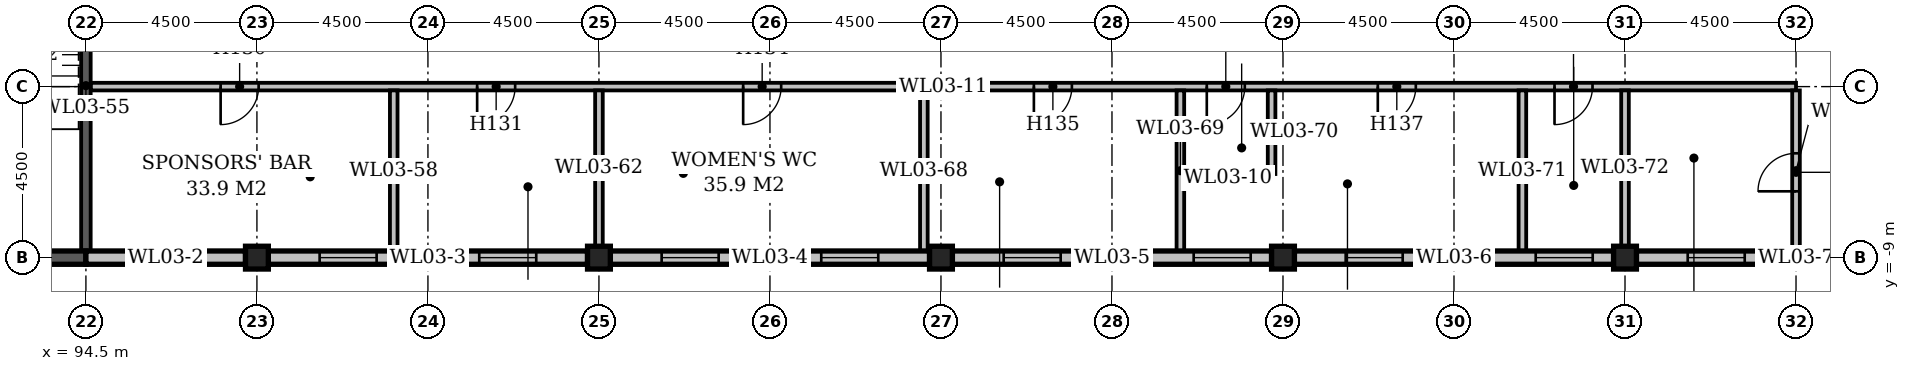
"""IFC4 building model, lengths in metres.
Left out: names, types, materials, properties, quantities, classifications, styles, units other than length and angle.
Written with IfcOpenShell. Run it as: python <this file> out.ifc"""

import sys

from ifc_helpers import new_model, si_unit, direction, frame, frame_2d, origin, origin_2d, place, context, subcontext, project, spatial, rectangle, extrude, element, fill, save


model = new_model("IFC4")
c1 = context("Model", 3, precision=1e-05, world=origin(), true_north=direction((0.0, 1.0)))
c2 = subcontext(c1, "Body", "Model", "MODEL_VIEW")
j1 = project(units=[si_unit("LENGTHUNIT", "METRE"), si_unit("PLANEANGLEUNIT", "RADIAN")], contexts=[c1])
p1 = place(None, origin())
s1 = spatial("IfcSite", under=j1, at=p1, CompositionType="ELEMENT")
p2 = place(p1, origin())
s2 = spatial("IfcBuilding", under=s1, at=p2, CompositionType="ELEMENT")
p3 = place(p2, frame((0.0, 0.0, 19.0)))
s3 = spatial("IfcBuildingStorey", under=s2, at=p3, CompositionType="ELEMENT", Elevation=19.0)
for number, where, z_axis, x_axis in (
    (1, (99.0, -9.0, 0.0), (0.0, 0.0, 1.0), (1.0, 0.0, 0.0)),
    (2, (108.0, -9.0, 0.0), (0.0, 0.0, 1.0), (1.0, 0.0, 0.0)),
    (3, (117.0, -9.0, 0.0), (0.0, 0.0, 1.0), (1.0, 0.0, 0.0)),
    (4, (126.0, -9.0, 0.0), (0.0, 0.0, 1.0), (1.0, 0.0, 0.0)),
    (5, (135.0, -9.0, 0.0), (0.0, 0.0, 1.0), (1.0, 0.0, 0.0)),
):
    element("IfcColumn", number, at=place(p3, frame(where, z_axis=z_axis, x_axis=x_axis)), inside=s3, PredefinedType="COLUMN", context=c2, shape_type="SweptSolid", body=[
        extrude(rectangle(XDim=0.6, YDim=0.6, at=origin_2d()), origin(), (0.0, 0.0, 1.0), 4.7),
    ])
p4 = place(p3, frame((90.35, -9.0, 0.0), z_axis=(0.0, 0.0, 1.0), x_axis=(1.0, 0.0, 0.0)))
e6 = element("IfcWall", 6, at=p4, inside=s3, PredefinedType="STANDARD", context=c2, shape_type="SweptSolid", body=[
    extrude(rectangle(XDim=4.15, YDim=0.35, at=frame_2d((2.075, 0.0))), origin(), (0.0, 0.0, 1.0), 5.0),
])
p5 = place(p3, frame((94.5, -9.0, 0.0), z_axis=(0.0, 0.0, 1.0), x_axis=(1.0, 0.0, 0.0)))
e7 = element("IfcWall", 7, at=p5, inside=s3, PredefinedType="STANDARD", context=c2, shape_type="SweptSolid", body=[
    extrude(rectangle(XDim=4.2, YDim=0.35, at=frame_2d((2.1, 0.0))), origin(), (0.0, 0.0, 1.0), 4.1),
])
p6 = place(p5, frame((1.35, 0.0, 1.0)))
e8 = element("IfcOpeningElement", 8, at=p6, cuts=e7, PredefinedType="OPENING", context=c2, shape_type="SweptSolid", body=[
    extrude(rectangle(XDim=1.5, YDim=2.4, at=frame_2d((0.75, 1.2))), frame((0.0, 0.187, 0.0), z_axis=(0.0, -1.0, 0.0), x_axis=(1.0, 0.0, 0.0)), (0.0, 0.0, 1.0), 0.374),
])
p7 = place(p3, frame((99.3, -9.0, 0.0), z_axis=(0.0, 0.0, 1.0), x_axis=(1.0, 0.0, 0.0)))
e9 = element("IfcWall", 9, at=p7, inside=s3, PredefinedType="STANDARD", context=c2, shape_type="SweptSolid", body=[
    extrude(rectangle(XDim=8.4, YDim=0.35, at=frame_2d((4.2, 0.0))), origin(), (0.0, 0.0, 1.0), 4.1),
])
p8 = place(p7, frame((1.35, 0.0, 1.0)))
e10 = element("IfcOpeningElement", 10, at=p8, cuts=e9, PredefinedType="OPENING", context=c2, shape_type="SweptSolid", body=[
    extrude(rectangle(XDim=1.5, YDim=2.4, at=frame_2d((0.75, 1.2))), frame((0.0, 0.187, 0.0), z_axis=(0.0, -1.0, 0.0), x_axis=(1.0, 0.0, 0.0)), (0.0, 0.0, 1.0), 0.374),
])
p9 = place(p7, frame((5.55, 0.0, 1.0)))
e11 = element("IfcOpeningElement", 11, at=p9, cuts=e9, PredefinedType="OPENING", context=c2, shape_type="SweptSolid", body=[
    extrude(rectangle(XDim=1.5, YDim=2.4, at=frame_2d((0.75, 1.2))), frame((0.0, 0.187, 0.0), z_axis=(0.0, -1.0, 0.0), x_axis=(1.0, 0.0, 0.0)), (0.0, 0.0, 1.0), 0.374),
])
p10 = place(p3, frame((108.3, -9.0, 0.0), z_axis=(0.0, 0.0, 1.0), x_axis=(1.0, 0.0, 0.0)))
e12 = element("IfcWall", 12, at=p10, inside=s3, PredefinedType="STANDARD", context=c2, shape_type="SweptSolid", body=[
    extrude(rectangle(XDim=8.4, YDim=0.35, at=frame_2d((4.2, 0.0))), origin(), (0.0, 0.0, 1.0), 4.1),
])
p11 = place(p10, frame((1.35, 0.0, 1.0)))
e13 = element("IfcOpeningElement", 13, at=p11, cuts=e12, PredefinedType="OPENING", context=c2, shape_type="SweptSolid", body=[
    extrude(rectangle(XDim=1.5, YDim=2.4, at=frame_2d((0.75, 1.2))), frame((0.0, 0.187, 0.0), z_axis=(0.0, -1.0, 0.0), x_axis=(1.0, 0.0, 0.0)), (0.0, 0.0, 1.0), 0.374),
])
p12 = place(p10, frame((5.55, 0.0, 1.0)))
e14 = element("IfcOpeningElement", 14, at=p12, cuts=e12, PredefinedType="OPENING", context=c2, shape_type="SweptSolid", body=[
    extrude(rectangle(XDim=1.5, YDim=2.4, at=frame_2d((0.75, 1.2))), frame((0.0, 0.187, 0.0), z_axis=(0.0, -1.0, 0.0), x_axis=(1.0, 0.0, 0.0)), (0.0, 0.0, 1.0), 0.374),
])
p13 = place(p3, frame((117.3, -9.0, 0.0), z_axis=(0.0, 0.0, 1.0), x_axis=(1.0, 0.0, 0.0)))
e15 = element("IfcWall", 15, at=p13, inside=s3, PredefinedType="STANDARD", context=c2, shape_type="SweptSolid", body=[
    extrude(rectangle(XDim=8.4, YDim=0.35, at=frame_2d((4.2, 0.0))), origin(), (0.0, 0.0, 1.0), 4.1),
])
p14 = place(p13, frame((1.35, 0.0, 1.0)))
e16 = element("IfcOpeningElement", 16, at=p14, cuts=e15, PredefinedType="OPENING", context=c2, shape_type="SweptSolid", body=[
    extrude(rectangle(XDim=1.5, YDim=2.4, at=frame_2d((0.75, 1.2))), frame((0.0, 0.187, 0.0), z_axis=(0.0, -1.0, 0.0), x_axis=(1.0, 0.0, 0.0)), (0.0, 0.0, 1.0), 0.374),
])
p15 = place(p13, frame((6.35, 0.0, 1.0)))
e17 = element("IfcOpeningElement", 17, at=p15, cuts=e15, PredefinedType="OPENING", context=c2, shape_type="SweptSolid", body=[
    extrude(rectangle(XDim=1.5, YDim=2.4, at=frame_2d((0.75, 1.2))), frame((0.0, 0.187, 0.0), z_axis=(0.0, -1.0, 0.0), x_axis=(1.0, 0.0, 0.0)), (0.0, 0.0, 1.0), 0.374),
])
p16 = place(p3, frame((126.3, -9.0, 0.0), z_axis=(0.0, 0.0, 1.0), x_axis=(1.0, 0.0, 0.0)))
e18 = element("IfcWall", 18, at=p16, inside=s3, PredefinedType="STANDARD", context=c2, shape_type="SweptSolid", body=[
    extrude(rectangle(XDim=8.4, YDim=0.35, at=frame_2d((4.2, 0.0))), origin(), (0.0, 0.0, 1.0), 4.1),
])
p17 = place(p16, frame((1.35, 0.0, 1.0)))
e19 = element("IfcOpeningElement", 19, at=p17, cuts=e18, PredefinedType="OPENING", context=c2, shape_type="SweptSolid", body=[
    extrude(rectangle(XDim=1.5, YDim=2.4, at=frame_2d((0.75, 1.2))), frame((0.0, 0.187, 0.0), z_axis=(0.0, -1.0, 0.0), x_axis=(1.0, 0.0, 0.0)), (0.0, 0.0, 1.0), 0.374),
])
p18 = place(p16, frame((6.35, 0.0, 1.0)))
e20 = element("IfcOpeningElement", 20, at=p18, cuts=e18, PredefinedType="OPENING", context=c2, shape_type="SweptSolid", body=[
    extrude(rectangle(XDim=1.5, YDim=2.4, at=frame_2d((0.75, 1.2))), frame((0.0, 0.187, 0.0), z_axis=(0.0, -1.0, 0.0), x_axis=(1.0, 0.0, 0.0)), (0.0, 0.0, 1.0), 0.374),
])
p19 = place(p3, frame((135.3, -9.0, 0.0), z_axis=(0.0, 0.0, 1.0), x_axis=(1.0, 0.0, 0.0)))
e21 = element("IfcWall", 21, at=p19, inside=s3, PredefinedType="STANDARD", context=c2, shape_type="SweptSolid", body=[
    extrude(rectangle(XDim=8.4, YDim=0.35, at=frame_2d((4.2, 0.0))), origin(), (0.0, 0.0, 1.0), 4.1),
])
p20 = place(p19, frame((1.35, 0.0, 1.0)))
e22 = element("IfcOpeningElement", 22, at=p20, cuts=e21, PredefinedType="OPENING", context=c2, shape_type="SweptSolid", body=[
    extrude(rectangle(XDim=1.5, YDim=2.4, at=frame_2d((0.75, 1.2))), frame((0.0, 0.187, 0.0), z_axis=(0.0, -1.0, 0.0), x_axis=(1.0, 0.0, 0.0)), (0.0, 0.0, 1.0), 0.374),
])
p21 = place(p3, frame((123.4, -6.9, 0.0), z_axis=(0.0, 0.0, 1.0), x_axis=(1.0, 0.0, 0.0)))
e23 = element("IfcWall", 23, at=p21, inside=s3, PredefinedType="STANDARD", context=c2, shape_type="SweptSolid", body=[
    extrude(rectangle(XDim=2.3, YDim=0.2, at=frame_2d((1.15, 0.0))), origin(), (0.0, 0.0, 1.0), 4.7),
])
p22 = place(p3, frame((94.625, -4.5, 0.0), z_axis=(0.0, 0.0, 1.0), x_axis=(1.0, 0.0, 0.0)))
e24 = element("IfcWall", 24, at=p22, inside=s3, PredefinedType="STANDARD", context=c2, shape_type="SweptSolid", body=[
    extrude(rectangle(XDim=44.875, YDim=0.2, at=frame_2d((22.438, 0.0))), origin(), (0.0, 0.0, 1.0), 4.7),
])
p23 = place(p22, frame((3.42, 0.0, 0.0)))
e25 = element("IfcOpeningElement", 25, at=p23, cuts=e24, PredefinedType="OPENING", context=c2, shape_type="SweptSolid", body=[
    extrude(rectangle(XDim=1.0, YDim=2.1, at=frame_2d((0.5, 1.05))), frame((0.0, 0.112, 0.0), z_axis=(0.0, -1.0, 0.0), x_axis=(1.0, 0.0, 0.0)), (0.0, 0.0, 1.0), 0.224),
])
p24 = place(p22, frame((10.17, 0.0, 0.0)))
e26 = element("IfcOpeningElement", 26, at=p24, cuts=e24, PredefinedType="OPENING", context=c2, shape_type="SweptSolid", body=[
    extrude(rectangle(XDim=1.0, YDim=2.1, at=frame_2d((0.5, 1.05))), frame((0.0, 0.112, 0.0), z_axis=(0.0, -1.0, 0.0), x_axis=(1.0, 0.0, 0.0)), (0.0, 0.0, 1.0), 0.224),
])
p25 = place(p22, frame((17.17, 0.0, 0.0)))
e27 = element("IfcOpeningElement", 27, at=p25, cuts=e24, PredefinedType="OPENING", context=c2, shape_type="SweptSolid", body=[
    extrude(rectangle(XDim=1.0, YDim=2.1, at=frame_2d((0.5, 1.05))), frame((0.0, 0.112, 0.0), z_axis=(0.0, -1.0, 0.0), x_axis=(1.0, 0.0, 0.0)), (0.0, 0.0, 1.0), 0.224),
])
p26 = place(p22, frame((24.82, 0.0, 0.0)))
e28 = element("IfcOpeningElement", 28, at=p26, cuts=e24, PredefinedType="OPENING", context=c2, shape_type="SweptSolid", body=[
    extrude(rectangle(XDim=1.0, YDim=2.1, at=frame_2d((0.5, 1.05))), frame((0.0, 0.112, 0.0), z_axis=(0.0, -1.0, 0.0), x_axis=(1.0, 0.0, 0.0)), (0.0, 0.0, 1.0), 0.224),
])
p27 = place(p22, frame((29.37, 0.0, 0.0)))
e29 = element("IfcOpeningElement", 29, at=p27, cuts=e24, PredefinedType="OPENING", context=c2, shape_type="SweptSolid", body=[
    extrude(rectangle(XDim=1.0, YDim=2.1, at=frame_2d((0.5, 1.05))), frame((0.0, 0.112, 0.0), z_axis=(0.0, -1.0, 0.0), x_axis=(1.0, 0.0, 0.0)), (0.0, 0.0, 1.0), 0.224),
])
p28 = place(p22, frame((33.87, 0.0, 0.0)))
e30 = element("IfcOpeningElement", 30, at=p28, cuts=e24, PredefinedType="OPENING", context=c2, shape_type="SweptSolid", body=[
    extrude(rectangle(XDim=1.0, YDim=2.1, at=frame_2d((0.5, 1.05))), frame((0.0, 0.112, 0.0), z_axis=(0.0, -1.0, 0.0), x_axis=(1.0, 0.0, 0.0)), (0.0, 0.0, 1.0), 0.224),
])
p29 = place(p22, frame((38.52, 0.0, 0.0)))
e31 = element("IfcOpeningElement", 31, at=p29, cuts=e24, PredefinedType="OPENING", context=c2, shape_type="SweptSolid", body=[
    extrude(rectangle(XDim=1.0, YDim=2.1, at=frame_2d((0.5, 1.05))), frame((0.0, 0.112, 0.0), z_axis=(0.0, -1.0, 0.0), x_axis=(1.0, 0.0, 0.0)), (0.0, 0.0, 1.0), 0.224),
])
p30 = place(p3, frame((94.5, -8.825, 0.0), z_axis=(0.0, 0.0, 1.0), x_axis=(0.0, 1.0, 0.0)))
e32 = element("IfcWall", 32, at=p30, inside=s3, PredefinedType="STANDARD", context=c2, shape_type="SweptSolid", body=[
    extrude(rectangle(XDim=8.7, YDim=0.25, at=frame_2d((4.35, 0.0))), origin(), (0.0, 0.0, 1.0), 5.0),
])
p31 = place(p30, frame((7.22, 0.0, 0.0)))
e33 = element("IfcOpeningElement", 33, at=p31, cuts=e32, PredefinedType="OPENING", context=c2, shape_type="SweptSolid", body=[
    extrude(rectangle(XDim=1.2, YDim=2.1, at=frame_2d((0.6, 1.05))), frame((0.0, 0.137, 0.0), z_axis=(0.0, -1.0, 0.0), x_axis=(1.0, 0.0, 0.0)), (0.0, 0.0, 1.0), 0.274),
])
p32 = place(p3, frame((102.6, -8.825, 0.0), z_axis=(0.0, 0.0, 1.0), x_axis=(0.0, 1.0, 0.0)))
e34 = element("IfcWall", 34, at=p32, inside=s3, PredefinedType="STANDARD", context=c2, shape_type="SweptSolid", body=[
    extrude(rectangle(XDim=4.225, YDim=0.2, at=frame_2d((2.112, 0.0))), origin(), (0.0, 0.0, 1.0), 4.7),
])
p33 = place(p3, frame((108.0, -8.7, 0.0), z_axis=(0.0, 0.0, 1.0), x_axis=(0.0, 1.0, 0.0)))
e35 = element("IfcWall", 35, at=p33, inside=s3, PredefinedType="STANDARD", context=c2, shape_type="SweptSolid", body=[
    extrude(rectangle(XDim=4.1, YDim=0.2, at=frame_2d((2.05, 0.0))), origin(), (0.0, 0.0, 1.0), 4.7),
])
for number, where, z_axis, x_axis in (
    (36, (116.55, -8.825, 0.0), (0.0, 0.0, 1.0), (0.0, 1.0, 0.0)),
    (37, (123.3, -8.825, 0.0), (0.0, 0.0, 1.0), (0.0, 1.0, 0.0)),
):
    element("IfcWall", number, at=place(p3, frame(where, z_axis=z_axis, x_axis=x_axis)), inside=s3, PredefinedType="STANDARD", context=c2, shape_type="SweptSolid", body=[
        extrude(rectangle(XDim=4.225, YDim=0.2, at=frame_2d((2.112, 0.0))), origin(), (0.0, 0.0, 1.0), 4.7),
    ])
p34 = place(p3, frame((125.7, -6.8, 0.0), z_axis=(0.0, 0.0, 1.0), x_axis=(0.0, 1.0, 0.0)))
e38 = element("IfcWall", 38, at=p34, inside=s3, PredefinedType="STANDARD", context=c2, shape_type="SweptSolid", body=[
    extrude(rectangle(XDim=2.2, YDim=0.2, at=frame_2d((1.1, 0.0))), origin(), (0.0, 0.0, 1.0), 4.7),
])
p35 = place(p3, frame((132.3, -8.825, 0.0), z_axis=(0.0, 0.0, 1.0), x_axis=(0.0, 1.0, 0.0)))
e39 = element("IfcWall", 39, at=p35, inside=s3, PredefinedType="STANDARD", context=c2, shape_type="SweptSolid", body=[
    extrude(rectangle(XDim=4.225, YDim=0.2, at=frame_2d((2.112, 0.0))), origin(), (0.0, 0.0, 1.0), 4.7),
])
p36 = place(p3, frame((135.0, -8.7, 0.0), z_axis=(0.0, 0.0, 1.0), x_axis=(0.0, 1.0, 0.0)))
e40 = element("IfcWall", 40, at=p36, inside=s3, PredefinedType="STANDARD", context=c2, shape_type="SweptSolid", body=[
    extrude(rectangle(XDim=4.1, YDim=0.2, at=frame_2d((2.05, 0.0))), origin(), (0.0, 0.0, 1.0), 4.7),
])
p37 = place(p3, frame((139.5, -8.825, 0.0), z_axis=(0.0, 0.0, 1.0), x_axis=(0.0, 1.0, 0.0)))
e41 = element("IfcWall", 41, at=p37, inside=s3, PredefinedType="STANDARD", context=c2, shape_type="SweptSolid", body=[
    extrude(rectangle(XDim=4.225, YDim=0.2, at=frame_2d((2.112, 0.0))), origin(), (0.0, 0.0, 1.0), 4.7),
])
p38 = place(p37, frame((1.57, 0.0, 0.0)))
e42 = element("IfcOpeningElement", 42, at=p38, cuts=e41, PredefinedType="OPENING", context=c2, shape_type="SweptSolid", body=[
    extrude(rectangle(XDim=1.0, YDim=2.1, at=frame_2d((0.5, 1.05))), frame((0.0, 0.112, 0.0), z_axis=(0.0, -1.0, 0.0), x_axis=(1.0, 0.0, 0.0)), (0.0, 0.0, 1.0), 0.224),
])
p39 = place(p23, frame((1.0, 0.0, 0.0), z_axis=(0.0, 0.0, 1.0), x_axis=(-1.0, 0.0, 0.0)))
e43 = element("IfcDoor", 43, at=p39, inside=s3, OperationType="SINGLE_SWING_RIGHT", PredefinedType="DOOR", context=c2, shape_type="SweptSolid", body=[
    extrude(rectangle(XDim=1.0, YDim=2.1, at=frame_2d((0.5, 1.05))), frame((0.0, 0.025, 0.0), z_axis=(0.0, -1.0, 0.0), x_axis=(1.0, 0.0, 0.0)), (0.0, 0.0, 1.0), 0.05),
])
fill(e25, e43)
p40 = place(p24, frame((1.0, 0.0, 0.0), z_axis=(0.0, 0.0, 1.0), x_axis=(-1.0, 0.0, 0.0)))
e44 = element("IfcDoor", 44, at=p40, inside=s3, OperationType="SINGLE_SWING_RIGHT", PredefinedType="DOOR", context=c2, shape_type="SweptSolid", body=[
    extrude(rectangle(XDim=1.0, YDim=2.1, at=frame_2d((0.5, 1.05))), frame((0.0, 0.025, 0.0), z_axis=(0.0, -1.0, 0.0), x_axis=(1.0, 0.0, 0.0)), (0.0, 0.0, 1.0), 0.05),
])
fill(e26, e44)
p41 = place(p38, origin())
e45 = element("IfcDoor", 45, at=p41, inside=s3, OperationType="SINGLE_SWING_LEFT", PredefinedType="DOOR", context=c2, shape_type="SweptSolid", body=[
    extrude(rectangle(XDim=1.0, YDim=2.1, at=frame_2d((0.5, 1.05))), frame((0.0, 0.025, 0.0), z_axis=(0.0, -1.0, 0.0), x_axis=(1.0, 0.0, 0.0)), (0.0, 0.0, 1.0), 0.05),
])
fill(e42, e45)
p42 = place(p25, frame((1.0, 0.0, 0.0), z_axis=(0.0, 0.0, 1.0), x_axis=(-1.0, 0.0, 0.0)))
e46 = element("IfcDoor", 46, at=p42, inside=s3, OperationType="SINGLE_SWING_RIGHT", PredefinedType="DOOR", context=c2, shape_type="SweptSolid", body=[
    extrude(rectangle(XDim=1.0, YDim=2.1, at=frame_2d((0.5, 1.05))), frame((0.0, 0.025, 0.0), z_axis=(0.0, -1.0, 0.0), x_axis=(1.0, 0.0, 0.0)), (0.0, 0.0, 1.0), 0.05),
])
fill(e27, e46)
p43 = place(p26, frame((1.0, 0.0, 0.0), z_axis=(0.0, 0.0, 1.0), x_axis=(-1.0, 0.0, 0.0)))
e47 = element("IfcDoor", 47, at=p43, inside=s3, OperationType="SINGLE_SWING_RIGHT", PredefinedType="DOOR", context=c2, shape_type="SweptSolid", body=[
    extrude(rectangle(XDim=1.0, YDim=2.1, at=frame_2d((0.5, 1.05))), frame((0.0, 0.025, 0.0), z_axis=(0.0, -1.0, 0.0), x_axis=(1.0, 0.0, 0.0)), (0.0, 0.0, 1.0), 0.05),
])
fill(e28, e47)
p44 = place(p27, frame((1.0, 0.0, 0.0), z_axis=(0.0, 0.0, 1.0), x_axis=(-1.0, 0.0, 0.0)))
e48 = element("IfcDoor", 48, at=p44, inside=s3, OperationType="SINGLE_SWING_RIGHT", PredefinedType="DOOR", context=c2, shape_type="SweptSolid", body=[
    extrude(rectangle(XDim=1.0, YDim=2.1, at=frame_2d((0.5, 1.05))), frame((0.0, 0.025, 0.0), z_axis=(0.0, -1.0, 0.0), x_axis=(1.0, 0.0, 0.0)), (0.0, 0.0, 1.0), 0.05),
])
fill(e29, e48)
p45 = place(p28, frame((1.0, 0.0, 0.0), z_axis=(0.0, 0.0, 1.0), x_axis=(-1.0, 0.0, 0.0)))
e49 = element("IfcDoor", 49, at=p45, inside=s3, OperationType="SINGLE_SWING_RIGHT", PredefinedType="DOOR", context=c2, shape_type="SweptSolid", body=[
    extrude(rectangle(XDim=1.0, YDim=2.1, at=frame_2d((0.5, 1.05))), frame((0.0, 0.025, 0.0), z_axis=(0.0, -1.0, 0.0), x_axis=(1.0, 0.0, 0.0)), (0.0, 0.0, 1.0), 0.05),
])
fill(e30, e49)
p46 = place(p29, frame((1.0, 0.0, 0.0), z_axis=(0.0, 0.0, 1.0), x_axis=(-1.0, 0.0, 0.0)))
e50 = element("IfcDoor", 50, at=p46, inside=s3, OperationType="SINGLE_SWING_RIGHT", PredefinedType="DOOR", context=c2, shape_type="SweptSolid", body=[
    extrude(rectangle(XDim=1.0, YDim=2.1, at=frame_2d((0.5, 1.05))), frame((0.0, 0.025, 0.0), z_axis=(0.0, -1.0, 0.0), x_axis=(1.0, 0.0, 0.0)), (0.0, 0.0, 1.0), 0.05),
])
fill(e31, e50)
p47 = place(p6, origin())
e51 = element("IfcWindow", 51, at=p47, inside=s3, PartitioningType="SINGLE_PANEL", PredefinedType="WINDOW", context=c2, shape_type="SweptSolid", body=[
    extrude(rectangle(XDim=1.5, YDim=2.4, at=frame_2d((0.75, 1.2))), frame((0.0, 0.03, 0.0), z_axis=(0.0, -1.0, 0.0), x_axis=(1.0, 0.0, 0.0)), (0.0, 0.0, 1.0), 0.06),
])
fill(e8, e51)
p48 = place(p8, origin())
e52 = element("IfcWindow", 52, at=p48, inside=s3, PartitioningType="SINGLE_PANEL", PredefinedType="WINDOW", context=c2, shape_type="SweptSolid", body=[
    extrude(rectangle(XDim=1.5, YDim=2.4, at=frame_2d((0.75, 1.2))), frame((0.0, 0.03, 0.0), z_axis=(0.0, -1.0, 0.0), x_axis=(1.0, 0.0, 0.0)), (0.0, 0.0, 1.0), 0.06),
])
fill(e10, e52)
p49 = place(p9, origin())
e53 = element("IfcWindow", 53, at=p49, inside=s3, PartitioningType="SINGLE_PANEL", PredefinedType="WINDOW", context=c2, shape_type="SweptSolid", body=[
    extrude(rectangle(XDim=1.5, YDim=2.4, at=frame_2d((0.75, 1.2))), frame((0.0, 0.03, 0.0), z_axis=(0.0, -1.0, 0.0), x_axis=(1.0, 0.0, 0.0)), (0.0, 0.0, 1.0), 0.06),
])
fill(e11, e53)
p50 = place(p11, origin())
e54 = element("IfcWindow", 54, at=p50, inside=s3, PartitioningType="SINGLE_PANEL", PredefinedType="WINDOW", context=c2, shape_type="SweptSolid", body=[
    extrude(rectangle(XDim=1.5, YDim=2.4, at=frame_2d((0.75, 1.2))), frame((0.0, 0.03, 0.0), z_axis=(0.0, -1.0, 0.0), x_axis=(1.0, 0.0, 0.0)), (0.0, 0.0, 1.0), 0.06),
])
fill(e13, e54)
p51 = place(p12, origin())
e55 = element("IfcWindow", 55, at=p51, inside=s3, PartitioningType="SINGLE_PANEL", PredefinedType="WINDOW", context=c2, shape_type="SweptSolid", body=[
    extrude(rectangle(XDim=1.5, YDim=2.4, at=frame_2d((0.75, 1.2))), frame((0.0, 0.03, 0.0), z_axis=(0.0, -1.0, 0.0), x_axis=(1.0, 0.0, 0.0)), (0.0, 0.0, 1.0), 0.06),
])
fill(e14, e55)
p52 = place(p14, origin())
e56 = element("IfcWindow", 56, at=p52, inside=s3, PartitioningType="SINGLE_PANEL", PredefinedType="WINDOW", context=c2, shape_type="SweptSolid", body=[
    extrude(rectangle(XDim=1.5, YDim=2.4, at=frame_2d((0.75, 1.2))), frame((0.0, 0.03, 0.0), z_axis=(0.0, -1.0, 0.0), x_axis=(1.0, 0.0, 0.0)), (0.0, 0.0, 1.0), 0.06),
])
fill(e16, e56)
p53 = place(p15, origin())
e57 = element("IfcWindow", 57, at=p53, inside=s3, PartitioningType="SINGLE_PANEL", PredefinedType="WINDOW", context=c2, shape_type="SweptSolid", body=[
    extrude(rectangle(XDim=1.5, YDim=2.4, at=frame_2d((0.75, 1.2))), frame((0.0, 0.03, 0.0), z_axis=(0.0, -1.0, 0.0), x_axis=(1.0, 0.0, 0.0)), (0.0, 0.0, 1.0), 0.06),
])
fill(e17, e57)
p54 = place(p17, origin())
e58 = element("IfcWindow", 58, at=p54, inside=s3, PartitioningType="SINGLE_PANEL", PredefinedType="WINDOW", context=c2, shape_type="SweptSolid", body=[
    extrude(rectangle(XDim=1.5, YDim=2.4, at=frame_2d((0.75, 1.2))), frame((0.0, 0.03, 0.0), z_axis=(0.0, -1.0, 0.0), x_axis=(1.0, 0.0, 0.0)), (0.0, 0.0, 1.0), 0.06),
])
fill(e19, e58)
p55 = place(p18, origin())
e59 = element("IfcWindow", 59, at=p55, inside=s3, PartitioningType="SINGLE_PANEL", PredefinedType="WINDOW", context=c2, shape_type="SweptSolid", body=[
    extrude(rectangle(XDim=1.5, YDim=2.4, at=frame_2d((0.75, 1.2))), frame((0.0, 0.03, 0.0), z_axis=(0.0, -1.0, 0.0), x_axis=(1.0, 0.0, 0.0)), (0.0, 0.0, 1.0), 0.06),
])
fill(e20, e59)
p56 = place(p20, origin())
e60 = element("IfcWindow", 60, at=p56, inside=s3, PartitioningType="SINGLE_PANEL", PredefinedType="WINDOW", context=c2, shape_type="SweptSolid", body=[
    extrude(rectangle(XDim=1.5, YDim=2.4, at=frame_2d((0.75, 1.2))), frame((0.0, 0.03, 0.0), z_axis=(0.0, -1.0, 0.0), x_axis=(1.0, 0.0, 0.0)), (0.0, 0.0, 1.0), 0.06),
])
fill(e22, e60)
save(model, sys.argv[1])
